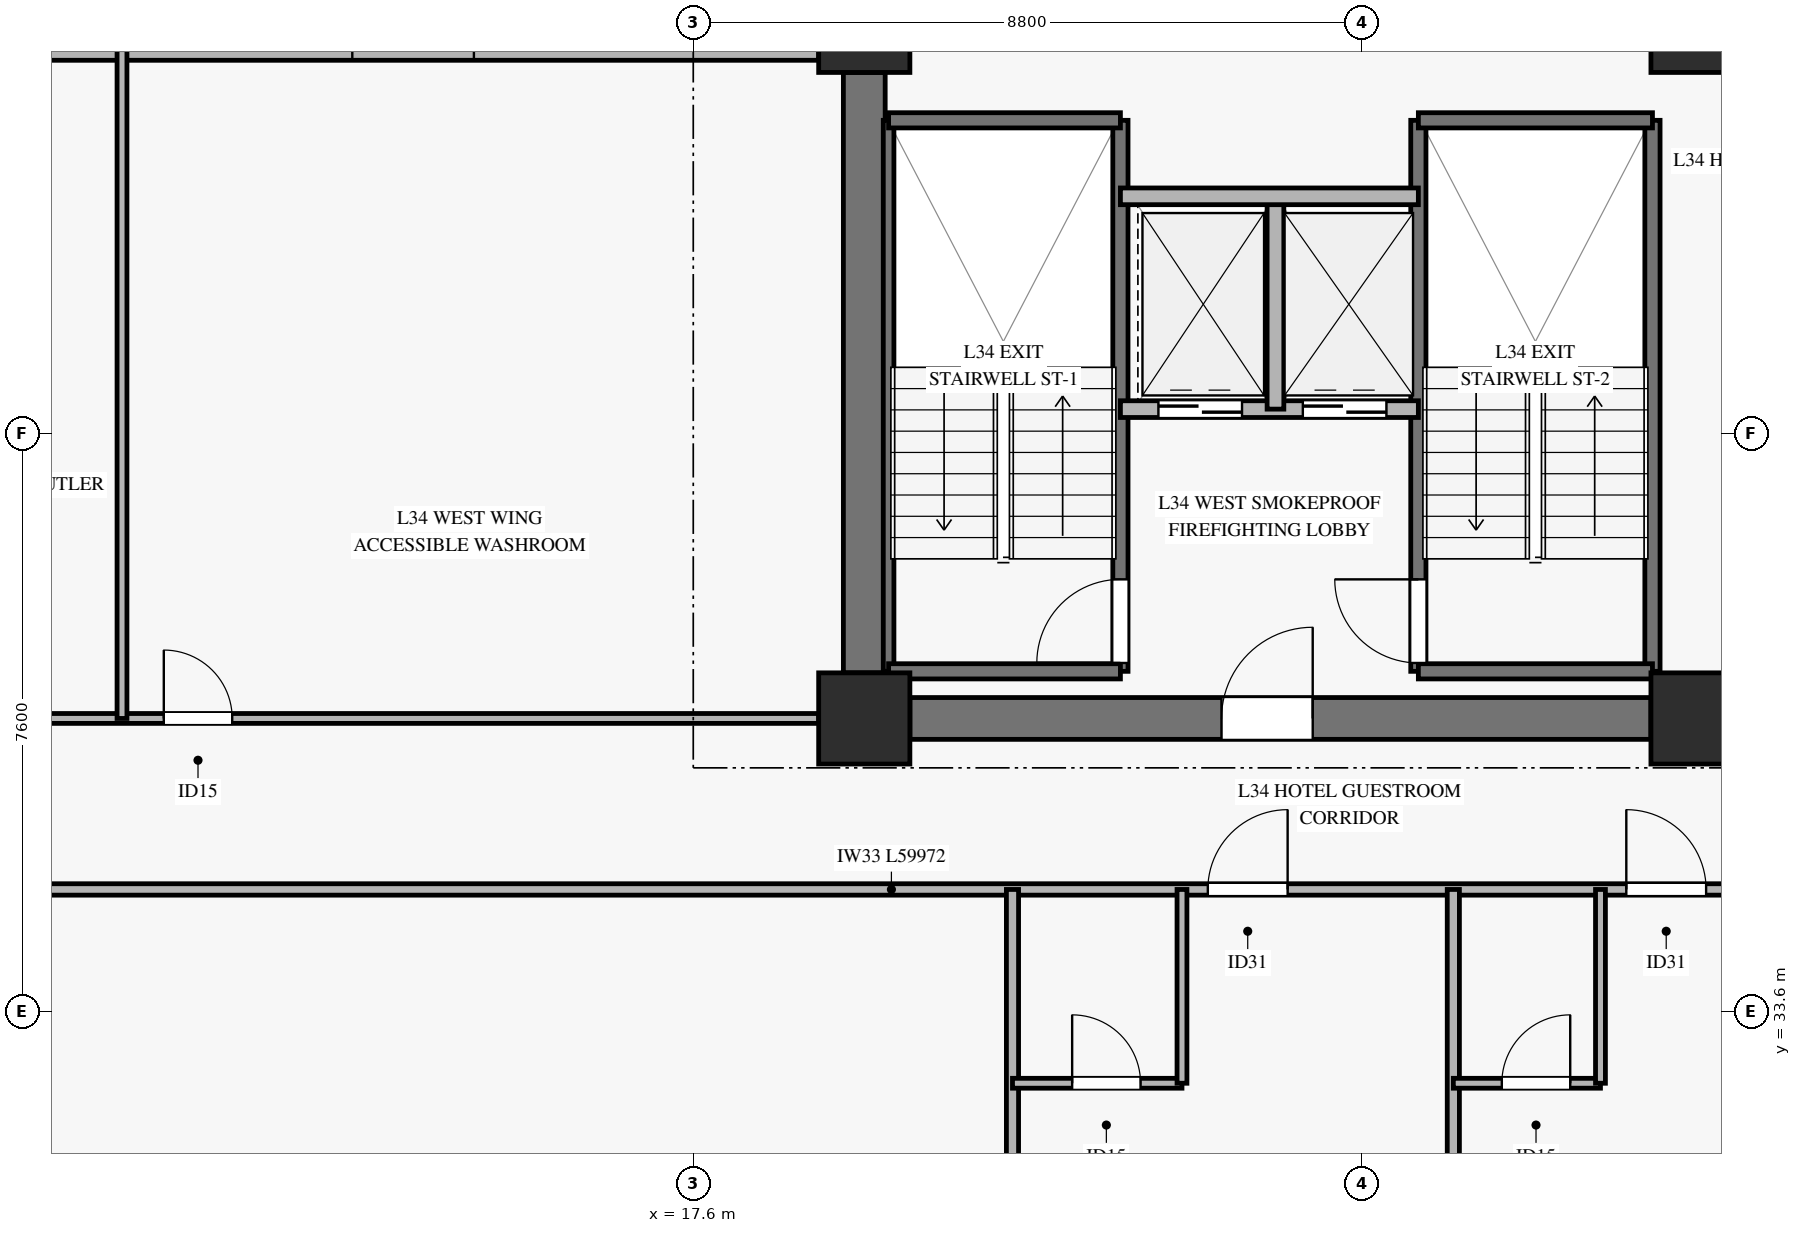
"""IFC4 building model, lengths in metres.
Left out: names, types, materials, properties, quantities, classifications, styles, units other than length and angle.
Written with IfcOpenShell. Run it as: python <this file> out.ifc"""

import sys

from ifc_helpers import new_model, si_unit, direction, frame, frame_2d, origin, origin_2d, place, context, subcontext, project, spatial, rectangle, extrude, source, transform, mapped, element, fill, save


model = new_model("IFC4")
c1 = context("Model", 3, precision=1e-05, world=origin(), true_north=direction((0.0, 1.0)))
c2 = subcontext(c1, "Body", "Model", "MODEL_VIEW")
j1 = project(units=[si_unit("LENGTHUNIT", "METRE"), si_unit("PLANEANGLEUNIT", "RADIAN")], contexts=[c1])
p1 = place(None, origin())
s1 = spatial("IfcSite", under=j1, at=p1, CompositionType="ELEMENT")
p2 = place(p1, origin())
s2 = spatial("IfcBuilding", under=s1, at=p2, CompositionType="ELEMENT")
p3 = place(p2, frame((0.0, 0.0, 141.2)))
s3 = spatial("IfcBuildingStorey", under=s2, at=p3, CompositionType="ELEMENT", Elevation=141.2)
m1 = source(origin(), c2, "Body", "SweptSolid", [
    extrude(rectangle(XDim=1.2, YDim=1.2, at=origin_2d()), origin(), (0.0, 0.0, 1.0), 3.22),
])
for number, where, z_axis, x_axis in (
    (1, (19.85, 37.45, 0.0), (0.0, 0.0, 1.0), (1.0, 0.0, 0.0)),
    (2, (19.85, 46.55, 0.0), (0.0, 0.0, 1.0), (1.0, 0.0, 0.0)),
    (3, (30.8, 37.45, 0.0), (0.0, 0.0, 1.0), (1.0, 0.0, 0.0)),
    (4, (30.8, 46.55, 0.0), (0.0, 0.0, 1.0), (1.0, 0.0, 0.0)),
):
    element("IfcColumn", number, at=place(p3, frame(where, z_axis=z_axis, x_axis=x_axis)), inside=s3, PredefinedType="PILASTER", context=c2, shape_type="MappedRepresentation", body=[
        mapped(m1, transform((0.0, 0.0, 0.0), x_axis=(1.0, 0.0, 0.0), y_axis=(0.0, 1.0, 0.0), z_axis=(0.0, 0.0, 1.0), scale=1.0)),
    ])
p4 = place(p3, frame((20.45, 37.45, 0.0), z_axis=(0.0, 0.0, 1.0), x_axis=(1.0, 0.0, 0.0)))
e5 = element("IfcWall", 5, at=p4, inside=s3, PredefinedType="SHEAR", context=c2, shape_type="SweptSolid", body=[
    extrude(rectangle(XDim=9.75, YDim=0.55, at=frame_2d((4.875, 0.0))), origin(), (0.0, 0.0, 1.0), 3.22),
])
p5 = place(p4, frame((4.1, 0.0, 0.0)))
e6 = element("IfcOpeningElement", 6, at=p5, cuts=e5, PredefinedType="OPENING", context=c2, shape_type="SweptSolid", body=[
    extrude(rectangle(XDim=1.2, YDim=2.15, at=frame_2d((0.6, 1.075))), frame((0.0, 0.285, 0.0), z_axis=(0.0, -1.0, 0.0), x_axis=(1.0, 0.0, 0.0)), (0.0, 0.0, 1.0), 0.57),
])
p6 = place(p3, frame((19.85, 38.05, 0.0), z_axis=(0.0, 0.0, 1.0), x_axis=(0.0, 1.0, 0.0)))
e7 = element("IfcWall", 7, at=p6, inside=s3, PredefinedType="SHEAR", context=c2, shape_type="SweptSolid", body=[
    extrude(rectangle(XDim=7.9, YDim=0.55, at=frame_2d((3.95, 0.0))), origin(), (0.0, 0.0, 1.0), 3.22),
])
p7 = place(p3, frame((8.579, 46.25, 0.0), z_axis=(0.0, 0.0, 1.0), x_axis=(1.0, 0.0, 0.0)))
e8 = element("IfcWall", 8, at=p7, inside=s3, PredefinedType="SOLIDWALL", context=c2, shape_type="SweptSolid", body=[
    extrude(rectangle(XDim=10.671, YDim=0.28, at=frame_2d((5.335, 0.0))), origin(), (0.0, 0.0, 1.0), 2.7),
])
p8 = place(p7, frame((4.535, 0.0, 0.45)))
e9 = element("IfcOpeningElement", 9, at=p8, cuts=e8, PredefinedType="OPENING", context=c2, shape_type="SweptSolid", body=[
    extrude(rectangle(XDim=1.6, YDim=2.0, at=frame_2d((0.8, 1.0))), frame((0.0, 0.15, 0.0), z_axis=(0.0, -1.0, 0.0), x_axis=(1.0, 0.0, 0.0)), (0.0, 0.0, 1.0), 0.3),
])
p9 = place(p3, frame((20.17, 38.07, 0.0), z_axis=(0.0, 0.0, 1.0), x_axis=(0.0, 1.0, 0.0)))
e10 = element("IfcWall", 10, at=p9, inside=s3, PredefinedType="SOLIDWALL", context=c2, shape_type="SweptSolid", body=[
    extrude(rectangle(XDim=7.25, YDim=0.14, at=frame_2d((3.625, 0.0))), origin(), (0.0, 0.0, 1.0), 3.5),
])
p10 = place(p3, frame((23.22, 38.07, 0.0), z_axis=(0.0, 0.0, 1.0), x_axis=(0.0, 1.0, 0.0)))
e11 = element("IfcWall", 11, at=p10, inside=s3, PredefinedType="SOLIDWALL", context=c2, shape_type="SweptSolid", body=[
    extrude(rectangle(XDim=7.25, YDim=0.2, at=frame_2d((3.625, 0.0))), origin(), (0.0, 0.0, 1.0), 3.5),
])
p11 = place(p10, frame((0.11, 0.0, 0.0)))
e12 = element("IfcOpeningElement", 12, at=p11, cuts=e11, PredefinedType="OPENING", context=c2, shape_type="SweptSolid", body=[
    extrude(rectangle(XDim=1.1, YDim=2.15, at=frame_2d((0.55, 1.075))), frame((0.0, 0.11, 0.0), z_axis=(0.0, -1.0, 0.0), x_axis=(1.0, 0.0, 0.0)), (0.0, 0.0, 1.0), 0.22),
])
for number, where, z_axis, x_axis in (
    (13, (20.17, 45.32, 0.0), (0.0, 0.0, 1.0), (1.0, 0.0, 0.0)),
    (14, (20.17, 38.07, 0.0), (0.0, 0.0, 1.0), (1.0, 0.0, 0.0)),
):
    element("IfcWall", number, at=place(p3, frame(where, z_axis=z_axis, x_axis=x_axis)), inside=s3, PredefinedType="SOLIDWALL", context=c2, shape_type="SweptSolid", body=[
        extrude(rectangle(XDim=3.05, YDim=0.2, at=frame_2d((1.525, 0.0))), origin(), (0.0, 0.0, 1.0), 3.5),
    ])
p12 = place(p3, frame((27.14, 38.07, 0.0), z_axis=(0.0, 0.0, 1.0), x_axis=(0.0, 1.0, 0.0)))
e15 = element("IfcWall", 15, at=p12, inside=s3, PredefinedType="SOLIDWALL", context=c2, shape_type="SweptSolid", body=[
    extrude(rectangle(XDim=7.25, YDim=0.2, at=frame_2d((3.625, 0.0))), origin(), (0.0, 0.0, 1.0), 3.5),
])
p13 = place(p12, frame((0.11, 0.0, 0.0)))
e16 = element("IfcOpeningElement", 16, at=p13, cuts=e15, PredefinedType="OPENING", context=c2, shape_type="SweptSolid", body=[
    extrude(rectangle(XDim=1.1, YDim=2.15, at=frame_2d((0.55, 1.075))), frame((0.0, 0.11, 0.0), z_axis=(0.0, -1.0, 0.0), x_axis=(1.0, 0.0, 0.0)), (0.0, 0.0, 1.0), 0.22),
])
p14 = place(p3, frame((30.22, 38.07, 0.0), z_axis=(0.0, 0.0, 1.0), x_axis=(0.0, 1.0, 0.0)))
e17 = element("IfcWall", 17, at=p14, inside=s3, PredefinedType="SOLIDWALL", context=c2, shape_type="SweptSolid", body=[
    extrude(rectangle(XDim=7.25, YDim=0.2, at=frame_2d((3.625, 0.0))), origin(), (0.0, 0.0, 1.0), 3.5),
])
for number, where, z_axis, x_axis in (
    (18, (27.14, 45.32, 0.0), (0.0, 0.0, 1.0), (1.0, 0.0, 0.0)),
    (19, (27.14, 38.07, 0.0), (0.0, 0.0, 1.0), (1.0, 0.0, 0.0)),
):
    element("IfcWall", number, at=place(p3, frame(where, z_axis=z_axis, x_axis=x_axis)), inside=s3, PredefinedType="SOLIDWALL", context=c2, shape_type="SweptSolid", body=[
        extrude(rectangle(XDim=3.08, YDim=0.2, at=frame_2d((1.54, 0.0))), origin(), (0.0, 0.0, 1.0), 3.5),
    ])
p15 = place(p3, frame((23.22, 41.52, 0.0), z_axis=(0.0, 0.0, 1.0), x_axis=(1.0, 0.0, 0.0)))
e20 = element("IfcWall", 20, at=p15, inside=s3, PredefinedType="SOLIDWALL", context=c2, shape_type="SweptSolid", body=[
    extrude(rectangle(XDim=3.92, YDim=0.22, at=frame_2d((1.96, 0.0))), origin(), (0.0, 0.0, 1.0), 3.22),
])
p16 = place(p15, frame((0.5, 0.0, 0.0)))
e21 = element("IfcOpeningElement", 21, at=p16, cuts=e20, PredefinedType="OPENING", context=c2, shape_type="SweptSolid", body=[
    extrude(rectangle(XDim=1.1, YDim=2.2, at=frame_2d((0.55, 1.1))), frame((0.0, 0.12, 0.0), z_axis=(0.0, -1.0, 0.0), x_axis=(1.0, 0.0, 0.0)), (0.0, 0.0, 1.0), 0.24),
])
p17 = place(p15, frame((2.4, 0.0, 0.0)))
e22 = element("IfcOpeningElement", 22, at=p17, cuts=e20, PredefinedType="OPENING", context=c2, shape_type="SweptSolid", body=[
    extrude(rectangle(XDim=1.1, YDim=2.2, at=frame_2d((0.55, 1.1))), frame((0.0, 0.12, 0.0), z_axis=(0.0, -1.0, 0.0), x_axis=(1.0, 0.0, 0.0)), (0.0, 0.0, 1.0), 0.24),
])
p18 = place(p3, frame((25.26, 41.52, 0.0), z_axis=(0.0, 0.0, 1.0), x_axis=(0.0, 1.0, 0.0)))
e23 = element("IfcWall", 23, at=p18, inside=s3, PredefinedType="SOLIDWALL", context=c2, shape_type="SweptSolid", body=[
    extrude(rectangle(XDim=2.8, YDim=0.22, at=frame_2d((1.4, 0.0))), origin(), (0.0, 0.0, 1.0), 3.22),
])
p19 = place(p3, frame((23.22, 44.32, 0.0), z_axis=(0.0, 0.0, 1.0), x_axis=(1.0, 0.0, 0.0)))
e24 = element("IfcWall", 24, at=p19, inside=s3, PredefinedType="SOLIDWALL", context=c2, shape_type="SweptSolid", body=[
    extrude(rectangle(XDim=3.92, YDim=0.22, at=frame_2d((1.96, 0.0))), origin(), (0.0, 0.0, 1.0), 3.22),
])
p20 = place(p3, frame((5.214, 35.2, 0.0), z_axis=(0.0, 0.0, 1.0), x_axis=(1.0, 0.0, 0.0)))
e25 = element("IfcWall", 25, at=p20, inside=s3, PredefinedType="PARTITIONING", context=c2, shape_type="SweptSolid", body=[
    extrude(rectangle(XDim=59.972, YDim=0.15, at=frame_2d((29.986, 0.0))), origin(), (0.0, 0.0, 1.0), 2.405),
])
p21 = place(p20, frame((2.77, 0.0, 0.0)))
e26 = element("IfcOpeningElement", 26, at=p21, cuts=e25, PredefinedType="OPENING", context=c2, shape_type="SweptSolid", body=[
    extrude(rectangle(XDim=1.05, YDim=2.15, at=frame_2d((0.525, 1.075))), frame((0.0, 0.085, 0.0), z_axis=(0.0, -1.0, 0.0), x_axis=(1.0, 0.0, 0.0)), (0.0, 0.0, 1.0), 0.17),
])
p22 = place(p20, frame((19.156, 0.0, 0.0)))
e27 = element("IfcOpeningElement", 27, at=p22, cuts=e25, PredefinedType="OPENING", context=c2, shape_type="SweptSolid", body=[
    extrude(rectangle(XDim=1.05, YDim=2.15, at=frame_2d((0.525, 1.075))), frame((0.0, 0.085, 0.0), z_axis=(0.0, -1.0, 0.0), x_axis=(1.0, 0.0, 0.0)), (0.0, 0.0, 1.0), 0.17),
])
p23 = place(p20, frame((24.662, 0.0, 0.0)))
e28 = element("IfcOpeningElement", 28, at=p23, cuts=e25, PredefinedType="OPENING", context=c2, shape_type="SweptSolid", body=[
    extrude(rectangle(XDim=1.05, YDim=2.15, at=frame_2d((0.525, 1.075))), frame((0.0, 0.085, 0.0), z_axis=(0.0, -1.0, 0.0), x_axis=(1.0, 0.0, 0.0)), (0.0, 0.0, 1.0), 0.17),
])
p24 = place(p20, frame((29.462, 0.0, 0.0)))
e29 = element("IfcOpeningElement", 29, at=p24, cuts=e25, PredefinedType="OPENING", context=c2, shape_type="SweptSolid", body=[
    extrude(rectangle(XDim=1.05, YDim=2.15, at=frame_2d((0.525, 1.075))), frame((0.0, 0.085, 0.0), z_axis=(0.0, -1.0, 0.0), x_axis=(1.0, 0.0, 0.0)), (0.0, 0.0, 1.0), 0.17),
])
p25 = place(p20, frame((34.262, 0.0, 0.0)))
e30 = element("IfcOpeningElement", 30, at=p25, cuts=e25, PredefinedType="OPENING", context=c2, shape_type="SweptSolid", body=[
    extrude(rectangle(XDim=1.05, YDim=2.15, at=frame_2d((0.525, 1.075))), frame((0.0, 0.085, 0.0), z_axis=(0.0, -1.0, 0.0), x_axis=(1.0, 0.0, 0.0)), (0.0, 0.0, 1.0), 0.17),
])
p26 = place(p20, frame((38.806, 0.0, 0.0)))
e31 = element("IfcOpeningElement", 31, at=p26, cuts=e25, PredefinedType="OPENING", context=c2, shape_type="SweptSolid", body=[
    extrude(rectangle(XDim=1.05, YDim=2.15, at=frame_2d((0.525, 1.075))), frame((0.0, 0.085, 0.0), z_axis=(0.0, -1.0, 0.0), x_axis=(1.0, 0.0, 0.0)), (0.0, 0.0, 1.0), 0.17),
])
p27 = place(p20, frame((42.956, 0.0, 0.0)))
e32 = element("IfcOpeningElement", 32, at=p27, cuts=e25, PredefinedType="OPENING", context=c2, shape_type="SweptSolid", body=[
    extrude(rectangle(XDim=1.05, YDim=2.15, at=frame_2d((0.525, 1.075))), frame((0.0, 0.085, 0.0), z_axis=(0.0, -1.0, 0.0), x_axis=(1.0, 0.0, 0.0)), (0.0, 0.0, 1.0), 0.17),
])
p28 = place(p3, frame((21.8, 8.045, 0.0), z_axis=(0.0, 0.0, 1.0), x_axis=(0.0, 1.0, 0.0)))
e33 = element("IfcWall", 33, at=p28, inside=s3, PredefinedType="PARTITIONING", context=c2, shape_type="SweptSolid", body=[
    extrude(rectangle(XDim=27.155, YDim=0.16, at=frame_2d((13.578, 0.0))), origin(), (0.0, 0.0, 1.0), 2.705),
])
p29 = place(p3, frame((21.8, 32.65, 0.0), z_axis=(0.0, 0.0, 1.0), x_axis=(1.0, 0.0, 0.0)))
e34 = element("IfcWall", 34, at=p29, inside=s3, PredefinedType="PARTITIONING", context=c2, shape_type="SweptSolid", body=[
    extrude(rectangle(XDim=2.23, YDim=0.13, at=frame_2d((1.115, 0.0))), origin(), (0.0, 0.0, 1.0), 2.755),
])
p30 = place(p29, frame((0.785, 0.0, 0.0)))
e35 = element("IfcOpeningElement", 35, at=p30, cuts=e34, PredefinedType="OPENING", context=c2, shape_type="SweptSolid", body=[
    extrude(rectangle(XDim=0.9, YDim=2.1, at=frame_2d((0.45, 1.05))), frame((0.0, 0.075, 0.0), z_axis=(0.0, -1.0, 0.0), x_axis=(1.0, 0.0, 0.0)), (0.0, 0.0, 1.0), 0.15),
])
p31 = place(p3, frame((24.03, 32.65, 0.0), z_axis=(0.0, 0.0, 1.0), x_axis=(0.0, 1.0, 0.0)))
e36 = element("IfcWall", 36, at=p31, inside=s3, PredefinedType="PARTITIONING", context=c2, shape_type="SweptSolid", body=[
    extrude(rectangle(XDim=2.55, YDim=0.13, at=frame_2d((1.275, 0.0))), origin(), (0.0, 0.0, 1.0), 3.22),
])
p32 = place(p3, frame((27.6, 8.045, 0.0), z_axis=(0.0, 0.0, 1.0), x_axis=(0.0, 1.0, 0.0)))
e37 = element("IfcWall", 37, at=p32, inside=s3, PredefinedType="PARTITIONING", context=c2, shape_type="SweptSolid", body=[
    extrude(rectangle(XDim=27.155, YDim=0.16, at=frame_2d((13.578, 0.0))), origin(), (0.0, 0.0, 1.0), 2.705),
])
p33 = place(p3, frame((27.6, 32.65, 0.0), z_axis=(0.0, 0.0, 1.0), x_axis=(1.0, 0.0, 0.0)))
e38 = element("IfcWall", 38, at=p33, inside=s3, PredefinedType="PARTITIONING", context=c2, shape_type="SweptSolid", body=[
    extrude(rectangle(XDim=1.936, YDim=0.13, at=frame_2d((0.968, 0.0))), origin(), (0.0, 0.0, 1.0), 2.755),
])
p34 = place(p33, frame((0.638, 0.0, 0.0)))
e39 = element("IfcOpeningElement", 39, at=p34, cuts=e38, PredefinedType="OPENING", context=c2, shape_type="SweptSolid", body=[
    extrude(rectangle(XDim=0.9, YDim=2.1, at=frame_2d((0.45, 1.05))), frame((0.0, 0.075, 0.0), z_axis=(0.0, -1.0, 0.0), x_axis=(1.0, 0.0, 0.0)), (0.0, 0.0, 1.0), 0.15),
])
p35 = place(p3, frame((29.536, 32.65, 0.0), z_axis=(0.0, 0.0, 1.0), x_axis=(0.0, 1.0, 0.0)))
e40 = element("IfcWall", 40, at=p35, inside=s3, PredefinedType="PARTITIONING", context=c2, shape_type="SweptSolid", body=[
    extrude(rectangle(XDim=2.55, YDim=0.13, at=frame_2d((1.275, 0.0))), origin(), (0.0, 0.0, 1.0), 3.22),
])
p36 = place(p3, frame((5.214, 37.45, 0.0), z_axis=(0.0, 0.0, 1.0), x_axis=(1.0, 0.0, 0.0)))
e41 = element("IfcWall", 41, at=p36, inside=s3, PredefinedType="PARTITIONING", context=c2, shape_type="SweptSolid", body=[
    extrude(rectangle(XDim=14.036, YDim=0.13, at=frame_2d((7.018, 0.0))), origin(), (0.0, 0.0, 1.0), 2.705),
])
p37 = place(p36, frame((0.9, 0.0, 0.0)))
e42 = element("IfcOpeningElement", 42, at=p37, cuts=e41, PredefinedType="OPENING", context=c2, shape_type="SweptSolid", body=[
    extrude(rectangle(XDim=0.95, YDim=2.1, at=frame_2d((0.475, 1.05))), frame((0.0, 0.075, 0.0), z_axis=(0.0, -1.0, 0.0), x_axis=(1.0, 0.0, 0.0)), (0.0, 0.0, 1.0), 0.15),
])
p38 = place(p36, frame((5.42, 0.0, 0.0)))
e43 = element("IfcOpeningElement", 43, at=p38, cuts=e41, PredefinedType="OPENING", context=c2, shape_type="SweptSolid", body=[
    extrude(rectangle(XDim=0.9, YDim=2.1, at=frame_2d((0.45, 1.05))), frame((0.0, 0.075, 0.0), z_axis=(0.0, -1.0, 0.0), x_axis=(1.0, 0.0, 0.0)), (0.0, 0.0, 1.0), 0.15),
])
p39 = place(p3, frame((10.084, 37.45, 0.0), z_axis=(0.0, 0.0, 1.0), x_axis=(0.0, 1.0, 0.0)))
e44 = element("IfcWall", 44, at=p39, inside=s3, PredefinedType="PARTITIONING", context=c2, shape_type="SweptSolid", body=[
    extrude(rectangle(XDim=8.8, YDim=0.13, at=frame_2d((4.4, 0.0))), origin(), (0.0, 0.0, 1.0), 3.22),
])
m2 = source(origin(), c2, "Body", "SweptSolid", [
    extrude(rectangle(XDim=1.1, YDim=2.15, at=frame_2d((0.55, 1.075))), frame((0.0, 0.025, 0.0), z_axis=(0.0, -1.0, 0.0), x_axis=(1.0, 0.0, 0.0)), (0.0, 0.0, 1.0), 0.05),
])
p40 = place(p11, origin())
e45 = element("IfcDoor", 45, at=p40, inside=s3, OperationType="SINGLE_SWING_LEFT", PredefinedType="DOOR", context=c2, shape_type="MappedRepresentation", body=[
    mapped(m2, transform((0.0, 0.0, 0.0), x_axis=(1.0, 0.0, 0.0), y_axis=(0.0, 1.0, 0.0), z_axis=(0.0, 0.0, 1.0), scale=1.0)),
])
fill(e12, e45)
p41 = place(p13, origin())
e46 = element("IfcDoor", 46, at=p41, inside=s3, OperationType="SINGLE_SWING_RIGHT", PredefinedType="DOOR", context=c2, shape_type="MappedRepresentation", body=[
    mapped(m2, transform((0.0, 0.0, 0.0), x_axis=(1.0, 0.0, 0.0), y_axis=(0.0, 1.0, 0.0), z_axis=(0.0, 0.0, 1.0), scale=1.0)),
])
fill(e16, e46)
m3 = source(origin(), c2, "Body", "SweptSolid", [
    extrude(rectangle(XDim=1.1, YDim=2.2, at=frame_2d((0.55, 1.1))), frame((0.0, 0.025, 0.0), z_axis=(0.0, -1.0, 0.0), x_axis=(1.0, 0.0, 0.0)), (0.0, 0.0, 1.0), 0.05),
])
p42 = place(p16, origin())
e47 = element("IfcDoor", 47, at=p42, inside=s3, OperationType="SLIDING_TO_LEFT", PredefinedType="DOOR", context=c2, shape_type="MappedRepresentation", body=[
    mapped(m3, transform((0.0, 0.0, 0.0), x_axis=(1.0, 0.0, 0.0), y_axis=(0.0, 1.0, 0.0), z_axis=(0.0, 0.0, 1.0), scale=1.0)),
])
fill(e21, e47)
p43 = place(p17, origin())
e48 = element("IfcDoor", 48, at=p43, inside=s3, OperationType="SLIDING_TO_LEFT", PredefinedType="DOOR", context=c2, shape_type="MappedRepresentation", body=[
    mapped(m3, transform((0.0, 0.0, 0.0), x_axis=(1.0, 0.0, 0.0), y_axis=(0.0, 1.0, 0.0), z_axis=(0.0, 0.0, 1.0), scale=1.0)),
])
fill(e22, e48)
m4 = source(origin(), c2, "Body", "SweptSolid", [
    extrude(rectangle(XDim=1.2, YDim=2.15, at=frame_2d((0.6, 1.075))), frame((0.0, 0.025, 0.0), z_axis=(0.0, -1.0, 0.0), x_axis=(1.0, 0.0, 0.0)), (0.0, 0.0, 1.0), 0.05),
])
p44 = place(p5, origin())
e49 = element("IfcDoor", 49, at=p44, inside=s3, OperationType="SINGLE_SWING_RIGHT", PredefinedType="DOOR", context=c2, shape_type="MappedRepresentation", body=[
    mapped(m4, transform((0.0, 0.0, 0.0), x_axis=(1.0, 0.0, 0.0), y_axis=(0.0, 1.0, 0.0), z_axis=(0.0, 0.0, 1.0), scale=1.0)),
])
fill(e6, e49)
m5 = source(origin(), c2, "Body", "SweptSolid", [
    extrude(rectangle(XDim=1.05, YDim=2.15, at=frame_2d((0.525, 1.075))), frame((0.0, 0.025, 0.0), z_axis=(0.0, -1.0, 0.0), x_axis=(1.0, 0.0, 0.0)), (0.0, 0.0, 1.0), 0.05),
])
p45 = place(p22, origin())
e50 = element("IfcDoor", 50, at=p45, inside=s3, OperationType="SINGLE_SWING_RIGHT", PredefinedType="DOOR", context=c2, shape_type="MappedRepresentation", body=[
    mapped(m5, transform((0.0, 0.0, 0.0), x_axis=(1.0, 0.0, 0.0), y_axis=(0.0, 1.0, 0.0), z_axis=(0.0, 0.0, 1.0), scale=1.0)),
])
fill(e27, e50)
m6 = source(origin(), c2, "Body", "SweptSolid", [
    extrude(rectangle(XDim=0.9, YDim=2.1, at=frame_2d((0.45, 1.05))), frame((0.0, 0.025, 0.0), z_axis=(0.0, -1.0, 0.0), x_axis=(1.0, 0.0, 0.0)), (0.0, 0.0, 1.0), 0.05),
])
p46 = place(p30, origin())
e51 = element("IfcDoor", 51, at=p46, inside=s3, OperationType="SINGLE_SWING_LEFT", PredefinedType="DOOR", context=c2, shape_type="MappedRepresentation", body=[
    mapped(m6, transform((0.0, 0.0, 0.0), x_axis=(1.0, 0.0, 0.0), y_axis=(0.0, 1.0, 0.0), z_axis=(0.0, 0.0, 1.0), scale=1.0)),
])
fill(e35, e51)
p47 = place(p23, origin())
e52 = element("IfcDoor", 52, at=p47, inside=s3, OperationType="SINGLE_SWING_LEFT", PredefinedType="DOOR", context=c2, shape_type="MappedRepresentation", body=[
    mapped(m5, transform((0.0, 0.0, 0.0), x_axis=(1.0, 0.0, 0.0), y_axis=(0.0, 1.0, 0.0), z_axis=(0.0, 0.0, 1.0), scale=1.0)),
])
fill(e28, e52)
p48 = place(p34, origin())
e53 = element("IfcDoor", 53, at=p48, inside=s3, OperationType="SINGLE_SWING_RIGHT", PredefinedType="DOOR", context=c2, shape_type="MappedRepresentation", body=[
    mapped(m6, transform((0.0, 0.0, 0.0), x_axis=(1.0, 0.0, 0.0), y_axis=(0.0, 1.0, 0.0), z_axis=(0.0, 0.0, 1.0), scale=1.0)),
])
fill(e39, e53)
p49 = place(p38, origin())
e54 = element("IfcDoor", 54, at=p49, inside=s3, OperationType="SINGLE_SWING_LEFT", PredefinedType="DOOR", context=c2, shape_type="MappedRepresentation", body=[
    mapped(m6, transform((0.0, 0.0, 0.0), x_axis=(1.0, 0.0, 0.0), y_axis=(0.0, 1.0, 0.0), z_axis=(0.0, 0.0, 1.0), scale=1.0)),
])
fill(e43, e54)
save(model, sys.argv[1])
